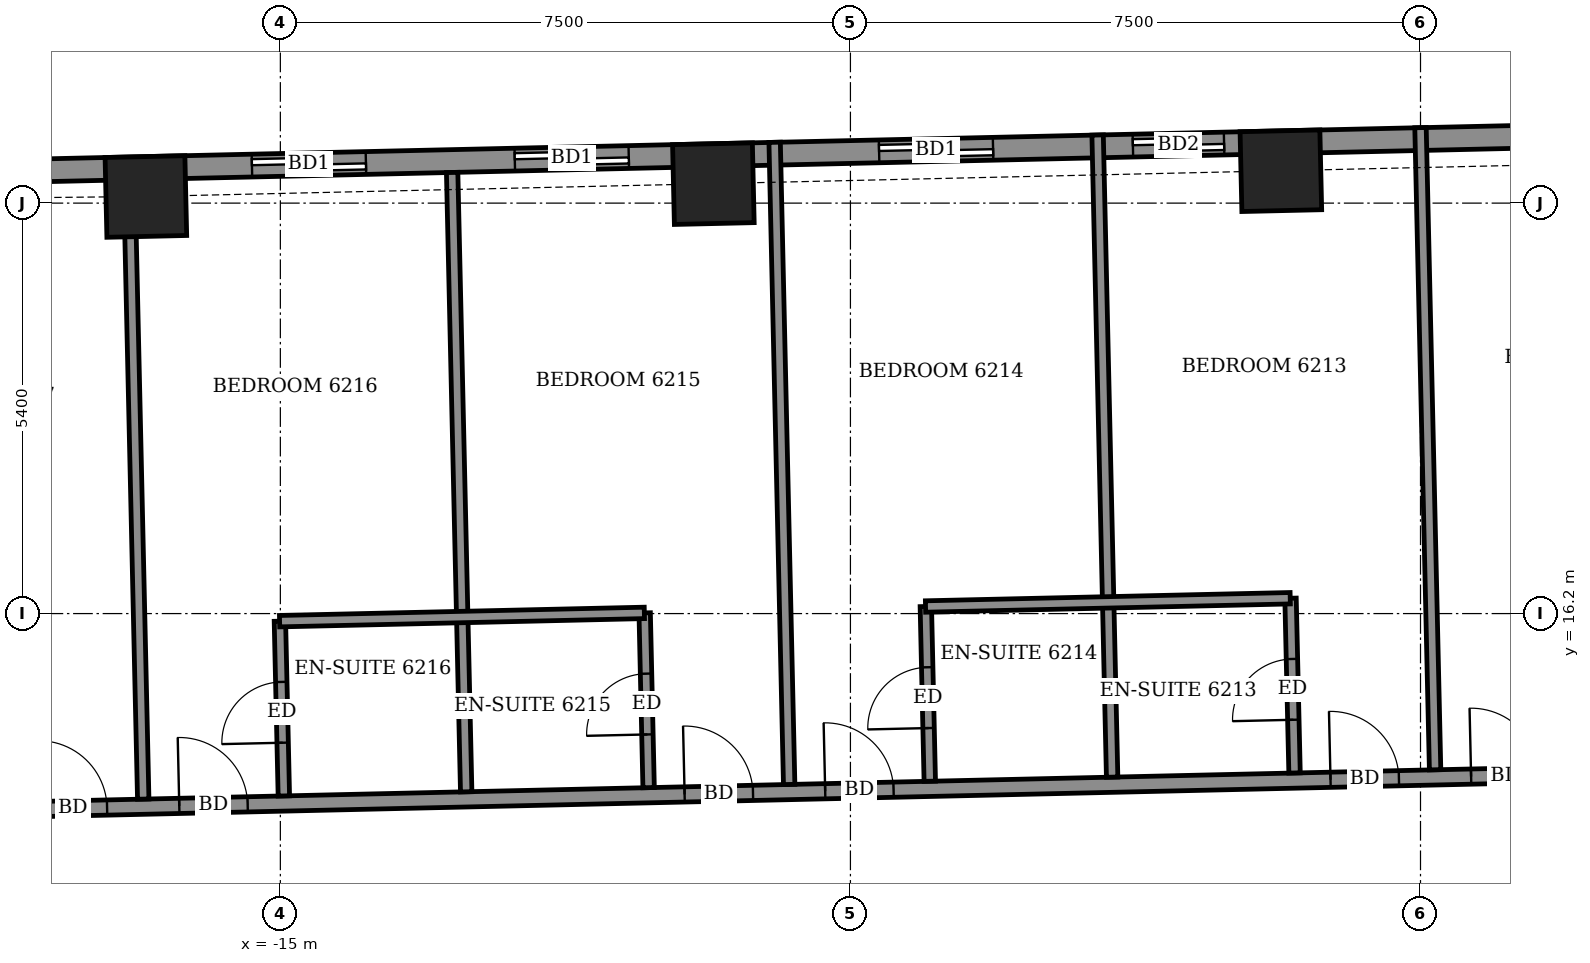
"""IFC4 building model, lengths in metres.
Left out: names, types, materials, properties, quantities, classifications, styles, units other than length and angle.
Written with IfcOpenShell. Run it as: python <this file> out.ifc"""

import sys

from ifc_helpers import new_model, si_unit, direction, frame, frame_2d, origin, origin_2d, place, context, subcontext, project, spatial, rectangle, extrude, element, fill, save


model = new_model("IFC4")
c1 = context("Model", 3, precision=1e-05, world=origin(), true_north=direction((0.0, 1.0)))
c2 = subcontext(c1, "Body", "Model", "MODEL_VIEW")
j1 = project(units=[si_unit("LENGTHUNIT", "METRE"), si_unit("PLANEANGLEUNIT", "RADIAN")], contexts=[c1])
p1 = place(None, origin())
s1 = spatial("IfcSite", under=j1, at=p1, CompositionType="ELEMENT")
p2 = place(p1, origin())
s2 = spatial("IfcBuilding", under=s1, at=p2, CompositionType="ELEMENT")
p3 = place(p2, frame((0.0, 0.0, 245.5)))
s3 = spatial("IfcBuildingStorey", under=s2, at=p3, CompositionType="ELEMENT", Elevation=245.5)
for number, where, z_axis, x_axis in (
    (1, (-1.837, 22.026, -0.55), (0.0, 0.0, 1.0), (-1.0, -0.023, 0.0)),
    (2, (-9.303, 21.856, -0.55), (0.0, 0.0, 1.0), (-1.0, -0.023, 0.0)),
    (3, (-16.769, 21.687, -0.55), (0.0, 0.0, 1.0), (-1.0, -0.023, 0.0)),
):
    element("IfcColumn", number, at=place(p3, frame(where, z_axis=z_axis, x_axis=x_axis)), inside=s3, PredefinedType="COLUMN", context=c2, shape_type="SweptSolid", body=[
        extrude(rectangle(XDim=1.05, YDim=1.05, at=origin_2d()), origin(), (0.0, 0.0, 1.0), 3.6),
    ])
p4 = place(p3, frame((20.403, 22.905, 0.0), z_axis=(0.0, 0.0, 1.0), x_axis=(-0.99974298964, -0.022670568288, 0.0)))
e4 = element("IfcWall", 4, at=p4, inside=s3, PredefinedType="SOLIDWALL", context=c2, shape_type="SweptSolid", body=[
    extrude(rectangle(XDim=44.509, YDim=0.3, at=frame_2d((22.254, 0.0))), origin(), (0.0, 0.0, 1.0), 2.5),
])
p5 = place(p4, frame((1.272, 0.0, 0.0)))
e5 = element("IfcOpeningElement", 5, at=p5, cuts=e4, PredefinedType="OPENING", context=c2, shape_type="SweptSolid", body=[
    extrude(rectangle(XDim=1.5, YDim=2.4, at=frame_2d((0.75, 1.2))), frame((0.0, 0.16, 0.0), z_axis=(0.0, -1.0, 0.0), x_axis=(1.0, 0.0, 0.0)), (0.0, 0.0, 1.0), 0.32),
])
p6 = place(p4, frame((4.501, 0.0, 0.0)))
e6 = element("IfcOpeningElement", 6, at=p6, cuts=e4, PredefinedType="OPENING", context=c2, shape_type="SweptSolid", body=[
    extrude(rectangle(XDim=1.5, YDim=2.4, at=frame_2d((0.75, 1.2))), frame((0.0, 0.16, 0.0), z_axis=(0.0, -1.0, 0.0), x_axis=(1.0, 0.0, 0.0)), (0.0, 0.0, 1.0), 0.32),
])
p7 = place(p4, frame((9.058, 0.0, 0.0)))
e7 = element("IfcOpeningElement", 7, at=p7, cuts=e4, PredefinedType="OPENING", context=c2, shape_type="SweptSolid", body=[
    extrude(rectangle(XDim=1.5, YDim=2.4, at=frame_2d((0.75, 1.2))), frame((0.0, 0.16, 0.0), z_axis=(0.0, -1.0, 0.0), x_axis=(1.0, 0.0, 0.0)), (0.0, 0.0, 1.0), 0.32),
])
p8 = place(p4, frame((12.46, 0.0, 0.0)))
e8 = element("IfcOpeningElement", 8, at=p8, cuts=e4, PredefinedType="OPENING", context=c2, shape_type="SweptSolid", body=[
    extrude(rectangle(XDim=1.5, YDim=2.4, at=frame_2d((0.75, 1.2))), frame((0.0, 0.16, 0.0), z_axis=(0.0, -1.0, 0.0), x_axis=(1.0, 0.0, 0.0)), (0.0, 0.0, 1.0), 0.32),
])
p9 = place(p4, frame((17.533, 0.0, 0.0)))
e9 = element("IfcOpeningElement", 9, at=p9, cuts=e4, PredefinedType="OPENING", context=c2, shape_type="SweptSolid", body=[
    extrude(rectangle(XDim=1.5, YDim=2.4, at=frame_2d((0.75, 1.2))), frame((0.0, 0.16, 0.0), z_axis=(0.0, -1.0, 0.0), x_axis=(1.0, 0.0, 0.0)), (0.0, 0.0, 1.0), 0.32),
])
p10 = place(p4, frame((22.993, 0.0, 0.0)))
e10 = element("IfcOpeningElement", 10, at=p10, cuts=e4, PredefinedType="OPENING", context=c2, shape_type="SweptSolid", body=[
    extrude(rectangle(XDim=1.2, YDim=2.4, at=frame_2d((0.6, 1.2))), frame((0.0, 0.16, 0.0), z_axis=(0.0, -1.0, 0.0), x_axis=(1.0, 0.0, 0.0)), (0.0, 0.0, 1.0), 0.32),
])
p11 = place(p4, frame((26.033, 0.0, 0.0)))
e11 = element("IfcOpeningElement", 11, at=p11, cuts=e4, PredefinedType="OPENING", context=c2, shape_type="SweptSolid", body=[
    extrude(rectangle(XDim=1.5, YDim=2.4, at=frame_2d((0.75, 1.2))), frame((0.0, 0.16, 0.0), z_axis=(0.0, -1.0, 0.0), x_axis=(1.0, 0.0, 0.0)), (0.0, 0.0, 1.0), 0.32),
])
p12 = place(p4, frame((30.827, 0.0, 0.0)))
e12 = element("IfcOpeningElement", 12, at=p12, cuts=e4, PredefinedType="OPENING", context=c2, shape_type="SweptSolid", body=[
    extrude(rectangle(XDim=1.5, YDim=2.4, at=frame_2d((0.75, 1.2))), frame((0.0, 0.16, 0.0), z_axis=(0.0, -1.0, 0.0), x_axis=(1.0, 0.0, 0.0)), (0.0, 0.0, 1.0), 0.32),
])
p13 = place(p4, frame((34.286, 0.0, 0.0)))
e13 = element("IfcOpeningElement", 13, at=p13, cuts=e4, PredefinedType="OPENING", context=c2, shape_type="SweptSolid", body=[
    extrude(rectangle(XDim=1.5, YDim=2.4, at=frame_2d((0.75, 1.2))), frame((0.0, 0.16, 0.0), z_axis=(0.0, -1.0, 0.0), x_axis=(1.0, 0.0, 0.0)), (0.0, 0.0, 1.0), 0.32),
])
p14 = place(p4, frame((38.811, 0.0, 0.0)))
e14 = element("IfcOpeningElement", 14, at=p14, cuts=e4, PredefinedType="OPENING", context=c2, shape_type="SweptSolid", body=[
    extrude(rectangle(XDim=1.5, YDim=2.4, at=frame_2d((0.75, 1.2))), frame((0.0, 0.16, 0.0), z_axis=(0.0, -1.0, 0.0), x_axis=(1.0, 0.0, 0.0)), (0.0, 0.0, 1.0), 0.32),
])
p15 = place(p4, frame((42.148, 0.0, 0.9)))
e15 = element("IfcOpeningElement", 15, at=p15, cuts=e4, PredefinedType="OPENING", context=c2, shape_type="SweptSolid", body=[
    extrude(rectangle(XDim=1.2, YDim=1.5, at=frame_2d((0.6, 0.75))), frame((0.0, 0.16, 0.0), z_axis=(0.0, -1.0, 0.0), x_axis=(1.0, 0.0, 0.0)), (0.0, 0.0, 1.0), 0.32),
])
p16 = place(p3, frame((-27.652, 13.413, 0.0), z_axis=(0.0, 0.0, 1.0), x_axis=(0.999742864992, 0.022676064408, 0.0)))
e16 = element("IfcWall", 16, at=p16, inside=s3, PredefinedType="PARTITIONING", context=c2, shape_type="SweptSolid", body=[
    extrude(rectangle(XDim=50.882, YDim=0.2, at=frame_2d((25.441, 0.0))), origin(), (0.0, 0.0, 1.0), 3.05),
])
p17 = place(p16, frame((47.801, 0.0, 0.0)))
e17 = element("IfcOpeningElement", 17, at=p17, cuts=e16, PredefinedType="OPENING", context=c2, shape_type="SweptSolid", body=[
    extrude(rectangle(XDim=1.0, YDim=2.1, at=frame_2d((0.5, 1.05))), frame((0.0, 0.11, 0.0), z_axis=(0.0, -1.0, 0.0), x_axis=(1.0, 0.0, 0.0)), (0.0, 0.0, 1.0), 0.22),
])
p18 = place(p16, frame((43.425, 0.0, 0.0)))
e18 = element("IfcOpeningElement", 18, at=p18, cuts=e16, PredefinedType="OPENING", context=c2, shape_type="SweptSolid", body=[
    extrude(rectangle(XDim=0.9, YDim=2.1, at=frame_2d((0.45, 1.05))), frame((0.0, 0.11, 0.0), z_axis=(0.0, -1.0, 0.0), x_axis=(1.0, 0.0, 0.0)), (0.0, 0.0, 1.0), 0.22),
])
p19 = place(p16, frame((36.8, 0.0, 0.0)))
e19 = element("IfcOpeningElement", 19, at=p19, cuts=e16, PredefinedType="OPENING", context=c2, shape_type="SweptSolid", body=[
    extrude(rectangle(XDim=0.9, YDim=2.1, at=frame_2d((0.45, 1.05))), frame((0.0, 0.11, 0.0), z_axis=(0.0, -1.0, 0.0), x_axis=(1.0, 0.0, 0.0)), (0.0, 0.0, 1.0), 0.22),
])
p20 = place(p16, frame((34.975, 0.0, 0.0)))
e20 = element("IfcOpeningElement", 20, at=p20, cuts=e16, PredefinedType="OPENING", context=c2, shape_type="SweptSolid", body=[
    extrude(rectangle(XDim=0.9, YDim=2.1, at=frame_2d((0.45, 1.05))), frame((0.0, 0.11, 0.0), z_axis=(0.0, -1.0, 0.0), x_axis=(1.0, 0.0, 0.0)), (0.0, 0.0, 1.0), 0.22),
])
p21 = place(p16, frame((28.325, 0.0, 0.0)))
e21 = element("IfcOpeningElement", 21, at=p21, cuts=e16, PredefinedType="OPENING", context=c2, shape_type="SweptSolid", body=[
    extrude(rectangle(XDim=0.9, YDim=2.1, at=frame_2d((0.45, 1.05))), frame((0.0, 0.11, 0.0), z_axis=(0.0, -1.0, 0.0), x_axis=(1.0, 0.0, 0.0)), (0.0, 0.0, 1.0), 0.22),
])
p22 = place(p16, frame((26.475, 0.0, 0.0)))
e22 = element("IfcOpeningElement", 22, at=p22, cuts=e16, PredefinedType="OPENING", context=c2, shape_type="SweptSolid", body=[
    extrude(rectangle(XDim=0.9, YDim=2.1, at=frame_2d((0.45, 1.05))), frame((0.0, 0.11, 0.0), z_axis=(0.0, -1.0, 0.0), x_axis=(1.0, 0.0, 0.0)), (0.0, 0.0, 1.0), 0.22),
])
p23 = place(p16, frame((19.825, 0.0, 0.0)))
e23 = element("IfcOpeningElement", 23, at=p23, cuts=e16, PredefinedType="OPENING", context=c2, shape_type="SweptSolid", body=[
    extrude(rectangle(XDim=0.9, YDim=2.1, at=frame_2d((0.45, 1.05))), frame((0.0, 0.11, 0.0), z_axis=(0.0, -1.0, 0.0), x_axis=(1.0, 0.0, 0.0)), (0.0, 0.0, 1.0), 0.22),
])
p24 = place(p16, frame((17.975, 0.0, 0.0)))
e24 = element("IfcOpeningElement", 24, at=p24, cuts=e16, PredefinedType="OPENING", context=c2, shape_type="SweptSolid", body=[
    extrude(rectangle(XDim=0.9, YDim=2.1, at=frame_2d((0.45, 1.05))), frame((0.0, 0.11, 0.0), z_axis=(0.0, -1.0, 0.0), x_axis=(1.0, 0.0, 0.0)), (0.0, 0.0, 1.0), 0.22),
])
p25 = place(p16, frame((11.325, 0.0, 0.0)))
e25 = element("IfcOpeningElement", 25, at=p25, cuts=e16, PredefinedType="OPENING", context=c2, shape_type="SweptSolid", body=[
    extrude(rectangle(XDim=0.9, YDim=2.1, at=frame_2d((0.45, 1.05))), frame((0.0, 0.11, 0.0), z_axis=(0.0, -1.0, 0.0), x_axis=(1.0, 0.0, 0.0)), (0.0, 0.0, 1.0), 0.22),
])
p26 = place(p16, frame((9.475, 0.0, 0.0)))
e26 = element("IfcOpeningElement", 26, at=p26, cuts=e16, PredefinedType="OPENING", context=c2, shape_type="SweptSolid", body=[
    extrude(rectangle(XDim=0.9, YDim=2.1, at=frame_2d((0.45, 1.05))), frame((0.0, 0.11, 0.0), z_axis=(0.0, -1.0, 0.0), x_axis=(1.0, 0.0, 0.0)), (0.0, 0.0, 1.0), 0.22),
])
p27 = place(p16, frame((2.772, 0.0, 0.0)))
e27 = element("IfcOpeningElement", 27, at=p27, cuts=e16, PredefinedType="OPENING", context=c2, shape_type="SweptSolid", body=[
    extrude(rectangle(XDim=1.0, YDim=2.1, at=frame_2d((0.5, 1.05))), frame((0.0, 0.11, 0.0), z_axis=(0.0, -1.0, 0.0), x_axis=(1.0, 0.0, 0.0)), (0.0, 0.0, 1.0), 0.22),
])
p28 = place(p3, frame((-16.804, 13.759, 0.0), z_axis=(0.0, 0.0, 1.0), x_axis=(-0.022586673637, 0.999744888546, 0.0)))
e28 = element("IfcWall", 28, at=p28, inside=s3, PredefinedType="PARTITIONING", context=c2, shape_type="SweptSolid", body=[
    extrude(rectangle(XDim=8.15, YDim=0.15, at=frame_2d((4.075, 0.0))), origin(), (0.0, 0.0, 1.0), 3.05),
])
p29 = place(p3, frame((-14.954, 13.801, 0.0), z_axis=(0.0, 0.0, 1.0), x_axis=(-0.022612884682, 0.999744296031, 0.0)))
e29 = element("IfcWall", 29, at=p29, inside=s3, PredefinedType="PARTITIONING", context=c2, shape_type="SweptSolid", body=[
    extrude(rectangle(XDim=2.3, YDim=0.15, at=frame_2d((1.15, 0.0))), origin(), (0.0, 0.0, 1.0), 3.05),
])
p30 = place(p29, frame((0.7, 0.0, 0.0)))
e30 = element("IfcOpeningElement", 30, at=p30, cuts=e29, PredefinedType="OPENING", context=c2, shape_type="SweptSolid", body=[
    extrude(rectangle(XDim=0.8, YDim=2.1, at=frame_2d((0.4, 1.05))), frame((0.0, 0.085, 0.0), z_axis=(0.0, -1.0, 0.0), x_axis=(1.0, 0.0, 0.0)), (0.0, 0.0, 1.0), 0.17),
])
p31 = place(p3, frame((-12.555, 13.855, 0.0), z_axis=(0.0, 0.0, 1.0), x_axis=(-0.022706435224, 0.999742175663, 0.0)))
e31 = element("IfcWall", 31, at=p31, inside=s3, PredefinedType="PARTITIONING", context=c2, shape_type="SweptSolid", body=[
    extrude(rectangle(XDim=8.15, YDim=0.15, at=frame_2d((4.075, 0.0))), origin(), (0.0, 0.0, 1.0), 2.5),
])
p32 = place(p3, frame((-10.155, 13.91, 0.0), z_axis=(0.0, 0.0, 1.0), x_axis=(-0.022612884682, 0.999744296031, 0.0)))
e32 = element("IfcWall", 32, at=p32, inside=s3, PredefinedType="PARTITIONING", context=c2, shape_type="SweptSolid", body=[
    extrude(rectangle(XDim=2.3, YDim=0.15, at=frame_2d((1.15, 0.0))), origin(), (0.0, 0.0, 1.0), 3.05),
])
p33 = place(p32, frame((0.7, 0.0, 0.0)))
e33 = element("IfcOpeningElement", 33, at=p33, cuts=e32, PredefinedType="OPENING", context=c2, shape_type="SweptSolid", body=[
    extrude(rectangle(XDim=0.8, YDim=2.1, at=frame_2d((0.4, 1.05))), frame((0.0, 0.085, 0.0), z_axis=(0.0, -1.0, 0.0), x_axis=(1.0, 0.0, 0.0)), (0.0, 0.0, 1.0), 0.17),
])
p34 = place(p3, frame((-8.306, 13.952, 0.0), z_axis=(0.0, 0.0, 1.0), x_axis=(-0.022622304913, 0.999744082913, 0.0)))
e34 = element("IfcWall", 34, at=p34, inside=s3, PredefinedType="PARTITIONING", context=c2, shape_type="SweptSolid", body=[
    extrude(rectangle(XDim=8.45, YDim=0.15, at=frame_2d((4.225, 0.0))), origin(), (0.0, 0.0, 1.0), 2.5),
])
p35 = place(p3, frame((-6.456, 13.994, 0.0), z_axis=(0.0, 0.0, 1.0), x_axis=(-0.022612884682, 0.999744296031, 0.0)))
e35 = element("IfcWall", 35, at=p35, inside=s3, PredefinedType="PARTITIONING", context=c2, shape_type="SweptSolid", body=[
    extrude(rectangle(XDim=2.3, YDim=0.15, at=frame_2d((1.15, 0.0))), origin(), (0.0, 0.0, 1.0), 3.05),
])
p36 = place(p35, frame((0.7, 0.0, 0.0)))
e36 = element("IfcOpeningElement", 36, at=p36, cuts=e35, PredefinedType="OPENING", context=c2, shape_type="SweptSolid", body=[
    extrude(rectangle(XDim=0.8, YDim=2.1, at=frame_2d((0.4, 1.05))), frame((0.0, 0.085, 0.0), z_axis=(0.0, -1.0, 0.0), x_axis=(1.0, 0.0, 0.0)), (0.0, 0.0, 1.0), 0.17),
])
p37 = place(p3, frame((-4.057, 14.048, 0.0), z_axis=(0.0, 0.0, 1.0), x_axis=(-0.022622304913, 0.999744082913, 0.0)))
e37 = element("IfcWall", 37, at=p37, inside=s3, PredefinedType="PARTITIONING", context=c2, shape_type="SweptSolid", body=[
    extrude(rectangle(XDim=8.45, YDim=0.15, at=frame_2d((4.225, 0.0))), origin(), (0.0, 0.0, 1.0), 2.5),
])
p38 = place(p3, frame((-1.657, 14.103, 0.0), z_axis=(0.0, 0.0, 1.0), x_axis=(-0.023037316498, 0.999734605807, 0.0)))
e38 = element("IfcWall", 38, at=p38, inside=s3, PredefinedType="PARTITIONING", context=c2, shape_type="SweptSolid", body=[
    extrude(rectangle(XDim=2.3, YDim=0.15, at=frame_2d((1.15, 0.0))), origin(), (0.0, 0.0, 1.0), 3.05),
])
p39 = place(p38, frame((0.7, 0.0, 0.0)))
e39 = element("IfcOpeningElement", 39, at=p39, cuts=e38, PredefinedType="OPENING", context=c2, shape_type="SweptSolid", body=[
    extrude(rectangle(XDim=0.8, YDim=2.1, at=frame_2d((0.4, 1.05))), frame((0.0, 0.085, 0.0), z_axis=(0.0, -1.0, 0.0), x_axis=(1.0, 0.0, 0.0)), (0.0, 0.0, 1.0), 0.17),
])
p40 = place(p3, frame((0.192, 14.145, 0.0), z_axis=(0.0, 0.0, 1.0), x_axis=(-0.022708935798, 0.999742118866, 0.0)))
e40 = element("IfcWall", 40, at=p40, inside=s3, PredefinedType="PARTITIONING", context=c2, shape_type="SweptSolid", body=[
    extrude(rectangle(XDim=8.45, YDim=0.15, at=frame_2d((4.225, 0.0))), origin(), (0.0, 0.0, 1.0), 2.5),
])
p41 = place(p3, frame((-15.01, 16.1, 0.0), z_axis=(0.0, 0.0, 1.0), x_axis=(0.999742701292, 0.022683280499, 0.0)))
e41 = element("IfcWall", 41, at=p41, inside=s3, PredefinedType="PARTITIONING", context=c2, shape_type="SweptSolid", body=[
    extrude(rectangle(XDim=4.8, YDim=0.15, at=frame_2d((2.4, 0.0))), origin(), (0.0, 0.0, 1.0), 3.05),
])
p42 = place(p3, frame((-6.512, 16.293, 0.0), z_axis=(0.0, 0.0, 1.0), x_axis=(0.999741415159, 0.022739894798, 0.0)))
e42 = element("IfcWall", 42, at=p42, inside=s3, PredefinedType="PARTITIONING", context=c2, shape_type="SweptSolid", body=[
    extrude(rectangle(XDim=4.799, YDim=0.15, at=frame_2d((2.399, 0.0))), origin(), (0.0, 0.0, 1.0), 3.05),
])
p43 = place(p10, origin())
e43 = element("IfcDoor", 43, at=p43, inside=s3, OperationType="SLIDING_TO_LEFT", PredefinedType="DOOR", context=c2, shape_type="SweptSolid", body=[
    extrude(rectangle(XDim=1.2, YDim=2.4, at=frame_2d((0.6, 1.2))), frame((0.0, 0.025, 0.0), z_axis=(0.0, -1.0, 0.0), x_axis=(1.0, 0.0, 0.0)), (0.0, 0.0, 1.0), 0.05),
])
fill(e10, e43)
p44 = place(p11, origin())
e44 = element("IfcDoor", 44, at=p44, inside=s3, OperationType="SLIDING_TO_LEFT", PredefinedType="DOOR", context=c2, shape_type="SweptSolid", body=[
    extrude(rectangle(XDim=1.5, YDim=2.4, at=frame_2d((0.75, 1.2))), frame((0.0, 0.025, 0.0), z_axis=(0.0, -1.0, 0.0), x_axis=(1.0, 0.0, 0.0)), (0.0, 0.0, 1.0), 0.05),
])
fill(e11, e44)
p45 = place(p12, origin())
e45 = element("IfcDoor", 45, at=p45, inside=s3, OperationType="SLIDING_TO_LEFT", PredefinedType="DOOR", context=c2, shape_type="SweptSolid", body=[
    extrude(rectangle(XDim=1.5, YDim=2.4, at=frame_2d((0.75, 1.2))), frame((0.0, 0.025, 0.0), z_axis=(0.0, -1.0, 0.0), x_axis=(1.0, 0.0, 0.0)), (0.0, 0.0, 1.0), 0.05),
])
fill(e12, e45)
p46 = place(p13, origin())
e46 = element("IfcDoor", 46, at=p46, inside=s3, OperationType="SLIDING_TO_LEFT", PredefinedType="DOOR", context=c2, shape_type="SweptSolid", body=[
    extrude(rectangle(XDim=1.5, YDim=2.4, at=frame_2d((0.75, 1.2))), frame((0.0, 0.025, 0.0), z_axis=(0.0, -1.0, 0.0), x_axis=(1.0, 0.0, 0.0)), (0.0, 0.0, 1.0), 0.05),
])
fill(e13, e46)
p47 = place(p21, origin())
e47 = element("IfcDoor", 47, at=p47, inside=s3, OperationType="SINGLE_SWING_RIGHT", PredefinedType="DOOR", context=c2, shape_type="SweptSolid", body=[
    extrude(rectangle(XDim=0.9, YDim=2.1, at=frame_2d((0.45, 1.05))), frame((0.0, 0.025, 0.0), z_axis=(0.0, -1.0, 0.0), x_axis=(1.0, 0.0, 0.0)), (0.0, 0.0, 1.0), 0.05),
])
fill(e21, e47)
p48 = place(p22, origin())
e48 = element("IfcDoor", 48, at=p48, inside=s3, OperationType="SINGLE_SWING_LEFT", PredefinedType="DOOR", context=c2, shape_type="SweptSolid", body=[
    extrude(rectangle(XDim=0.9, YDim=2.1, at=frame_2d((0.45, 1.05))), frame((0.0, 0.025, 0.0), z_axis=(0.0, -1.0, 0.0), x_axis=(1.0, 0.0, 0.0)), (0.0, 0.0, 1.0), 0.05),
])
fill(e22, e48)
p49 = place(p39, origin())
e49 = element("IfcDoor", 49, at=p49, inside=s3, OperationType="SINGLE_SWING_LEFT", PredefinedType="DOOR", context=c2, shape_type="SweptSolid", body=[
    extrude(rectangle(XDim=0.8, YDim=2.1, at=frame_2d((0.4, 1.05))), frame((0.0, 0.025, 0.0), z_axis=(0.0, -1.0, 0.0), x_axis=(1.0, 0.0, 0.0)), (0.0, 0.0, 1.0), 0.05),
])
fill(e39, e49)
p50 = place(p23, origin())
e50 = element("IfcDoor", 50, at=p50, inside=s3, OperationType="SINGLE_SWING_RIGHT", PredefinedType="DOOR", context=c2, shape_type="SweptSolid", body=[
    extrude(rectangle(XDim=0.9, YDim=2.1, at=frame_2d((0.45, 1.05))), frame((0.0, 0.025, 0.0), z_axis=(0.0, -1.0, 0.0), x_axis=(1.0, 0.0, 0.0)), (0.0, 0.0, 1.0), 0.05),
])
fill(e23, e50)
p51 = place(p36, origin())
e51 = element("IfcDoor", 51, at=p51, inside=s3, OperationType="SINGLE_SWING_RIGHT", PredefinedType="DOOR", context=c2, shape_type="SweptSolid", body=[
    extrude(rectangle(XDim=0.8, YDim=2.1, at=frame_2d((0.4, 1.05))), frame((0.0, 0.025, 0.0), z_axis=(0.0, -1.0, 0.0), x_axis=(1.0, 0.0, 0.0)), (0.0, 0.0, 1.0), 0.05),
])
fill(e36, e51)
p52 = place(p24, origin())
e52 = element("IfcDoor", 52, at=p52, inside=s3, OperationType="SINGLE_SWING_LEFT", PredefinedType="DOOR", context=c2, shape_type="SweptSolid", body=[
    extrude(rectangle(XDim=0.9, YDim=2.1, at=frame_2d((0.45, 1.05))), frame((0.0, 0.025, 0.0), z_axis=(0.0, -1.0, 0.0), x_axis=(1.0, 0.0, 0.0)), (0.0, 0.0, 1.0), 0.05),
])
fill(e24, e52)
p53 = place(p33, origin())
e53 = element("IfcDoor", 53, at=p53, inside=s3, OperationType="SINGLE_SWING_LEFT", PredefinedType="DOOR", context=c2, shape_type="SweptSolid", body=[
    extrude(rectangle(XDim=0.8, YDim=2.1, at=frame_2d((0.4, 1.05))), frame((0.0, 0.025, 0.0), z_axis=(0.0, -1.0, 0.0), x_axis=(1.0, 0.0, 0.0)), (0.0, 0.0, 1.0), 0.05),
])
fill(e33, e53)
p54 = place(p25, origin())
e54 = element("IfcDoor", 54, at=p54, inside=s3, OperationType="SINGLE_SWING_RIGHT", PredefinedType="DOOR", context=c2, shape_type="SweptSolid", body=[
    extrude(rectangle(XDim=0.9, YDim=2.1, at=frame_2d((0.45, 1.05))), frame((0.0, 0.025, 0.0), z_axis=(0.0, -1.0, 0.0), x_axis=(1.0, 0.0, 0.0)), (0.0, 0.0, 1.0), 0.05),
])
fill(e25, e54)
p55 = place(p30, origin())
e55 = element("IfcDoor", 55, at=p55, inside=s3, OperationType="SINGLE_SWING_RIGHT", PredefinedType="DOOR", context=c2, shape_type="SweptSolid", body=[
    extrude(rectangle(XDim=0.8, YDim=2.1, at=frame_2d((0.4, 1.05))), frame((0.0, 0.025, 0.0), z_axis=(0.0, -1.0, 0.0), x_axis=(1.0, 0.0, 0.0)), (0.0, 0.0, 1.0), 0.05),
])
fill(e30, e55)
p56 = place(p26, origin())
e56 = element("IfcDoor", 56, at=p56, inside=s3, OperationType="SINGLE_SWING_LEFT", PredefinedType="DOOR", context=c2, shape_type="SweptSolid", body=[
    extrude(rectangle(XDim=0.9, YDim=2.1, at=frame_2d((0.45, 1.05))), frame((0.0, 0.025, 0.0), z_axis=(0.0, -1.0, 0.0), x_axis=(1.0, 0.0, 0.0)), (0.0, 0.0, 1.0), 0.05),
])
fill(e26, e56)
save(model, sys.argv[1])
